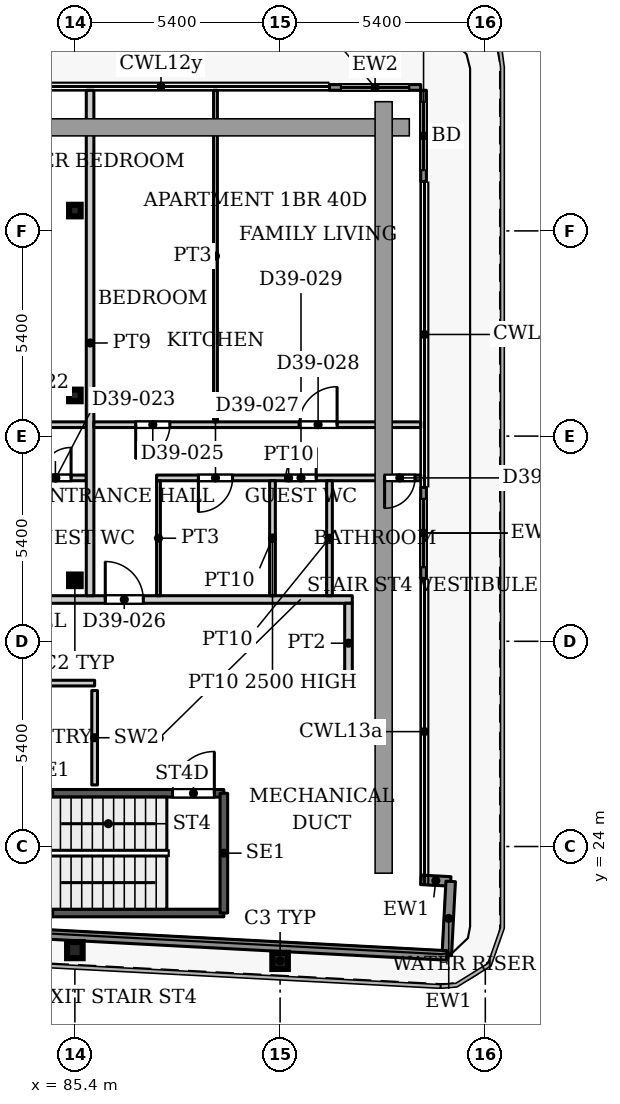
"""IFC4 building model, lengths in metres.
Left out: names, types, materials, properties, quantities, classifications, styles, units other than length and angle.
Written with IfcOpenShell. Run it as: python <this file> out.ifc"""

import sys

from ifc_helpers import new_model, si_unit, direction, frame, frame_2d, origin, origin_2d, place, context, subcontext, project, spatial, rectangle, hollow_rectangle, i_section, extrude, source, transform, mapped, element, fill, save


model = new_model("IFC4")
c1 = context("Model", 3, precision=1e-05, world=origin(), true_north=direction((0.0, 1.0)))
c2 = subcontext(c1, "Body", "Model", "MODEL_VIEW")
j1 = project(units=[si_unit("LENGTHUNIT", "METRE"), si_unit("PLANEANGLEUNIT", "RADIAN")], contexts=[c1])
p1 = place(None, origin())
s1 = spatial("IfcSite", under=j1, at=p1, CompositionType="ELEMENT")
p2 = place(p1, origin())
s2 = spatial("IfcBuilding", under=s1, at=p2, CompositionType="ELEMENT")
p3 = place(p2, frame((0.0, 0.0, 172.1)))
s3 = spatial("IfcBuildingStorey", under=s2, at=p3, CompositionType="ELEMENT", Elevation=172.1)
for number, where, z_axis, x_axis in (
    (1, (90.8, 20.99, 0.0), (0.0, 0.0, 1.0), (1.0, 0.0, 0.0)),
    (2, (85.4, 21.274, 0.0), (0.0, 0.0, 1.0), (1.0, 0.0, 0.0)),
):
    element("IfcColumn", number, at=place(p3, frame(where, z_axis=z_axis, x_axis=x_axis)), inside=s3, PredefinedType="COLUMN", context=c2, shape_type="SweptSolid", body=[
        extrude(i_section(OverallWidth=0.409, OverallDepth=0.425, WebThickness=0.033, FlangeThickness=0.052, FilletRadius=0.013, at=origin_2d()), origin(), (0.0, 0.0, 1.0), 3.9),
    ])
for number, where, z_axis, x_axis in (
    (3, (85.4, 31.005, 0.0), (0.0, 0.0, 1.0), (1.0, 0.0, 0.0)),
    (4, (85.4, 35.87, 0.0), (0.0, 0.0, 1.0), (1.0, 0.0, 0.0)),
    (5, (85.4, 40.735, 0.0), (0.0, 0.0, 1.0), (1.0, 0.0, 0.0)),
):
    element("IfcColumn", number, at=place(p3, frame(where, z_axis=z_axis, x_axis=x_axis)), inside=s3, PredefinedType="COLUMN", context=c2, shape_type="SweptSolid", body=[
        extrude(hollow_rectangle(XDim=0.305, YDim=0.305, WallThickness=0.016, InnerFilletRadius=0.016, OuterFilletRadius=0.032, at=origin_2d()), origin(), (0.0, 0.0, 1.0), 3.9),
    ])
p4 = place(p3, frame((92.1, 43.975, 0.0), z_axis=(0.0, 0.0, 1.0), x_axis=(1.0, 0.0, 0.0)))
e6 = element("IfcWall", 6, at=p4, inside=s3, PredefinedType="SOLIDWALL", context=c2, shape_type="SweptSolid", body=[
    extrude(rectangle(XDim=2.4, YDim=0.15, at=frame_2d((1.2, 0.0))), origin(), (0.0, 0.0, 1.0), 3.75),
])
p5 = place(p4, frame((0.3, 0.0, 0.0)))
e7 = element("IfcOpeningElement", 7, at=p5, cuts=e6, PredefinedType="OPENING", context=c2, shape_type="SweptSolid", body=[
    extrude(rectangle(XDim=1.8, YDim=2.4, at=frame_2d((0.9, 1.2))), frame((0.0, 0.085, 0.0), z_axis=(0.0, -1.0, 0.0), x_axis=(1.0, 0.0, 0.0)), (0.0, 0.0, 1.0), 0.17),
])
p6 = place(p3, frame((94.575, 43.9, 0.0), z_axis=(0.0, 0.0, 1.0), x_axis=(0.0, -1.0, 0.0)))
e8 = element("IfcWall", 8, at=p6, inside=s3, PredefinedType="SOLIDWALL", context=c2, shape_type="SweptSolid", body=[
    extrude(rectangle(XDim=2.4, YDim=0.15, at=frame_2d((1.2, 0.0))), origin(), (0.0, 0.0, 1.0), 3.75),
])
p7 = place(p6, frame((0.3, 0.0, 0.0)))
e9 = element("IfcOpeningElement", 9, at=p7, cuts=e8, PredefinedType="OPENING", context=c2, shape_type="SweptSolid", body=[
    extrude(rectangle(XDim=1.8, YDim=2.4, at=frame_2d((0.9, 1.2))), frame((0.0, 0.085, 0.0), z_axis=(0.0, -1.0, 0.0), x_axis=(1.0, 0.0, 0.0)), (0.0, 0.0, 1.0), 0.17),
])
p8 = place(p3, frame((94.575, 33.449, 0.0), z_axis=(0.0, 0.0, 1.0), x_axis=(0.0, -1.0, 0.0)))
e10 = element("IfcWall", 10, at=p8, inside=s3, PredefinedType="SOLIDWALL", context=c2, shape_type="SweptSolid", body=[
    extrude(rectangle(XDim=2.4, YDim=0.15, at=frame_2d((1.2, 0.0))), origin(), (0.0, 0.0, 1.0), 3.75),
])
p9 = place(p8, frame((0.3, 0.0, 0.0)))
e11 = element("IfcOpeningElement", 11, at=p9, cuts=e10, PredefinedType="OPENING", context=c2, shape_type="SweptSolid", body=[
    extrude(rectangle(XDim=1.8, YDim=2.4, at=frame_2d((0.9, 1.2))), frame((0.0, 0.085, 0.0), z_axis=(0.0, -1.0, 0.0), x_axis=(1.0, 0.0, 0.0)), (0.0, 0.0, 1.0), 0.17),
])
p10 = place(p3, frame((94.507, 23.123, 0.0), z_axis=(0.0, 0.0, 1.0), x_axis=(0.998561284263, -0.053622398031, 0.0)))
e12 = element("IfcWall", 12, at=p10, inside=s3, PredefinedType="SOLIDWALL", context=c2, shape_type="SweptSolid", body=[
    extrude(rectangle(XDim=0.783, YDim=0.25, at=frame_2d((0.392, 0.0))), origin(), (0.0, 0.0, 1.0), 3.75),
])
p11 = place(p3, frame((95.289, 23.081, 0.0), z_axis=(0.0, 0.0, 1.0), x_axis=(-0.052841433274, -0.998602915542, 0.0)))
e13 = element("IfcWall", 13, at=p11, inside=s3, PredefinedType="SOLIDWALL", context=c2, shape_type="SweptSolid", body=[
    extrude(rectangle(XDim=1.95, YDim=0.25, at=frame_2d((0.975, 0.0))), origin(), (0.0, 0.0, 1.0), 3.75),
])
p12 = place(p3, frame((95.186, 21.134, 0.0), z_axis=(0.0, 0.0, 1.0), x_axis=(-0.998617201448, 0.052570761569, 0.0)))
e14 = element("IfcWall", 14, at=p12, inside=s3, PredefinedType="SOLIDWALL", context=c2, shape_type="SweptSolid", body=[
    extrude(rectangle(XDim=61.232, YDim=0.25, at=frame_2d((30.616, 0.0))), origin(), (0.0, 0.0, 1.0), 3.75),
])
p13 = place(p3, frame((80.16, 22.25, 0.0), z_axis=(0.0, 0.0, 1.0), x_axis=(1.0, 0.0, 0.0)))
e15 = element("IfcWall", 15, at=p13, inside=s3, PredefinedType="SHEAR", context=c2, shape_type="SweptSolid", body=[
    extrude(rectangle(XDim=9.16, YDim=0.2, at=frame_2d((4.58, 0.0))), origin(), (0.0, 0.0, 1.0), 3.9),
])
p14 = place(p3, frame((80.16, 25.4, 0.0), z_axis=(0.0, 0.0, 1.0), x_axis=(1.0, 0.0, 0.0)))
e16 = element("IfcWall", 16, at=p14, inside=s3, PredefinedType="SHEAR", context=c2, shape_type="SweptSolid", body=[
    extrude(rectangle(XDim=9.16, YDim=0.2, at=frame_2d((4.58, 0.0))), origin(), (0.0, 0.0, 1.0), 3.9),
])
p15 = place(p14, frame((7.81, 0.0, 0.0)))
e17 = element("IfcOpeningElement", 17, at=p15, cuts=e16, PredefinedType="OPENING", context=c2, shape_type="SweptSolid", body=[
    extrude(rectangle(XDim=1.1, YDim=2.2, at=frame_2d((0.55, 1.1))), frame((0.0, 0.11, 0.0), z_axis=(0.0, -1.0, 0.0), x_axis=(1.0, 0.0, 0.0)), (0.0, 0.0, 1.0), 0.22),
])
p16 = place(p3, frame((89.32, 22.25, 0.0), z_axis=(0.0, 0.0, 1.0), x_axis=(0.0, 1.0, 0.0)))
e18 = element("IfcWall", 18, at=p16, inside=s3, PredefinedType="SHEAR", context=c2, shape_type="SweptSolid", body=[
    extrude(rectangle(XDim=3.15, YDim=0.2, at=frame_2d((1.575, 0.0))), origin(), (0.0, 0.0, 1.0), 3.9),
])
p17 = place(p3, frame((81.441, 28.3, 0.0), z_axis=(0.0, 0.0, 1.0), x_axis=(1.0, 0.0, 0.0)))
e19 = element("IfcWall", 19, at=p17, inside=s3, PredefinedType="PARTITIONING", context=c2, shape_type="SweptSolid", body=[
    extrude(rectangle(XDim=4.479, YDim=0.15, at=frame_2d((2.24, 0.0))), origin(), (0.0, 0.0, 1.0), 3.9),
])
p18 = place(p17, frame((1.789, 0.0, 0.0)))
e20 = element("IfcOpeningElement", 20, at=p18, cuts=e19, PredefinedType="OPENING", context=c2, shape_type="SweptSolid", body=[
    extrude(rectangle(XDim=0.9, YDim=2.2, at=frame_2d((0.45, 1.1))), frame((0.0, 0.085, 0.0), z_axis=(0.0, -1.0, 0.0), x_axis=(1.0, 0.0, 0.0)), (0.0, 0.0, 1.0), 0.17),
])
p19 = place(p3, frame((85.92, 25.62, 0.0), z_axis=(0.0, 0.0, 1.0), x_axis=(0.0, 1.0, 0.0)))
e21 = element("IfcWall", 21, at=p19, inside=s3, PredefinedType="PARTITIONING", context=c2, shape_type="SweptSolid", body=[
    extrude(rectangle(XDim=2.485, YDim=0.15, at=frame_2d((1.242, 0.0))), origin(), (0.0, 0.0, 1.0), 3.9),
])
p20 = place(p3, frame((53.549, 30.5, 0.0), z_axis=(0.0, 0.0, 1.0), x_axis=(1.0, 0.0, 0.0)))
e22 = element("IfcWall", 22, at=p20, inside=s3, PredefinedType="PARTITIONING", context=c2, shape_type="SweptSolid", body=[
    extrude(rectangle(XDim=39.151, YDim=0.2, at=frame_2d((19.575, 0.0))), origin(), (0.0, 0.0, 1.0), 3.6),
])
p21 = place(p20, frame((2.801, 0.0, 0.0)))
e23 = element("IfcOpeningElement", 23, at=p21, cuts=e22, PredefinedType="OPENING", context=c2, shape_type="SweptSolid", body=[
    extrude(rectangle(XDim=1.0, YDim=2.1, at=frame_2d((0.5, 1.05))), frame((0.0, 0.11, 0.0), z_axis=(0.0, -1.0, 0.0), x_axis=(1.0, 0.0, 0.0)), (0.0, 0.0, 1.0), 0.22),
])
p22 = place(p20, frame((9.851, 0.0, 0.0)))
e24 = element("IfcOpeningElement", 24, at=p22, cuts=e22, PredefinedType="OPENING", context=c2, shape_type="SweptSolid", body=[
    extrude(rectangle(XDim=1.0, YDim=2.1, at=frame_2d((0.5, 1.05))), frame((0.0, 0.11, 0.0), z_axis=(0.0, -1.0, 0.0), x_axis=(1.0, 0.0, 0.0)), (0.0, 0.0, 1.0), 0.22),
])
p23 = place(p20, frame((28.751, 0.0, 0.0)))
e25 = element("IfcOpeningElement", 25, at=p23, cuts=e22, PredefinedType="OPENING", context=c2, shape_type="SweptSolid", body=[
    extrude(rectangle(XDim=1.0, YDim=2.1, at=frame_2d((0.5, 1.05))), frame((0.0, 0.11, 0.0), z_axis=(0.0, -1.0, 0.0), x_axis=(1.0, 0.0, 0.0)), (0.0, 0.0, 1.0), 0.22),
])
p24 = place(p20, frame((32.651, 0.0, 0.0)))
e26 = element("IfcOpeningElement", 26, at=p24, cuts=e22, PredefinedType="OPENING", context=c2, shape_type="SweptSolid", body=[
    extrude(rectangle(XDim=1.0, YDim=2.1, at=frame_2d((0.5, 1.05))), frame((0.0, 0.11, 0.0), z_axis=(0.0, -1.0, 0.0), x_axis=(1.0, 0.0, 0.0)), (0.0, 0.0, 1.0), 0.22),
])
p25 = place(p3, frame((75.4, 35.1, 0.0), z_axis=(0.0, 0.0, 1.0), x_axis=(1.0, 0.0, 0.0)))
e27 = element("IfcWall", 27, at=p25, inside=s3, PredefinedType="PARTITIONING", context=c2, shape_type="SweptSolid", body=[
    extrude(rectangle(XDim=10.3, YDim=0.15, at=frame_2d((5.15, 0.0))), origin(), (0.0, 0.0, 1.0), 3.6),
])
p26 = place(p25, frame((5.3, 0.0, 0.0)))
e28 = element("IfcOpeningElement", 28, at=p26, cuts=e27, PredefinedType="OPENING", context=c2, shape_type="SweptSolid", body=[
    extrude(rectangle(XDim=0.9, YDim=2.1, at=frame_2d((0.45, 1.05))), frame((0.0, 0.085, 0.0), z_axis=(0.0, -1.0, 0.0), x_axis=(1.0, 0.0, 0.0)), (0.0, 0.0, 1.0), 0.17),
])
p27 = place(p25, frame((1.65, 0.0, 0.0)))
e29 = element("IfcOpeningElement", 29, at=p27, cuts=e27, PredefinedType="OPENING", context=c2, shape_type="SweptSolid", body=[
    extrude(rectangle(XDim=1.0, YDim=2.1, at=frame_2d((0.5, 1.05))), frame((0.0, 0.085, 0.0), z_axis=(0.0, -1.0, 0.0), x_axis=(1.0, 0.0, 0.0)), (0.0, 0.0, 1.0), 0.17),
])
p28 = place(p25, frame((8.3, 0.0, 0.0)))
e30 = element("IfcOpeningElement", 30, at=p28, cuts=e27, PredefinedType="OPENING", context=c2, shape_type="SweptSolid", body=[
    extrude(rectangle(XDim=0.9, YDim=2.1, at=frame_2d((0.45, 1.05))), frame((0.0, 0.085, 0.0), z_axis=(0.0, -1.0, 0.0), x_axis=(1.0, 0.0, 0.0)), (0.0, 0.0, 1.0), 0.17),
])
p29 = place(p3, frame((84.075, 33.7, 0.0), z_axis=(0.0, 0.0, 1.0), x_axis=(1.0, 0.0, 0.0)))
e31 = element("IfcWall", 31, at=p29, inside=s3, PredefinedType="PARTITIONING", context=c2, shape_type="SweptSolid", body=[
    extrude(rectangle(XDim=1.625, YDim=0.15, at=frame_2d((0.812, 0.0))), origin(), (0.0, 0.0, 1.0), 3.6),
])
p30 = place(p29, frame((0.425, 0.0, 0.0)))
e32 = element("IfcOpeningElement", 32, at=p30, cuts=e31, PredefinedType="OPENING", context=c2, shape_type="SweptSolid", body=[
    extrude(rectangle(XDim=0.8, YDim=2.1, at=frame_2d((0.4, 1.05))), frame((0.0, 0.085, 0.0), z_axis=(0.0, -1.0, 0.0), x_axis=(1.0, 0.0, 0.0)), (0.0, 0.0, 1.0), 0.17),
])
p31 = place(p3, frame((85.8, 30.6, 0.0), z_axis=(0.0, 0.0, 1.0), x_axis=(0.0, 1.0, 0.0)))
e33 = element("IfcWall", 33, at=p31, inside=s3, PredefinedType="PARTITIONING", context=c2, shape_type="SweptSolid", body=[
    extrude(rectangle(XDim=13.3, YDim=0.2, at=frame_2d((6.65, 0.0))), origin(), (0.0, 0.0, 1.0), 3.6),
])
p32 = place(p3, frame((85.9, 35.1, 0.0), z_axis=(0.0, 0.0, 1.0), x_axis=(1.0, 0.0, 0.0)))
e34 = element("IfcWall", 34, at=p32, inside=s3, PredefinedType="PARTITIONING", context=c2, shape_type="SweptSolid", body=[
    extrude(rectangle(XDim=8.6, YDim=0.15, at=frame_2d((4.3, 0.0))), origin(), (0.0, 0.0, 1.0), 3.6),
])
p33 = place(p32, frame((1.1, 0.0, 0.0)))
e35 = element("IfcOpeningElement", 35, at=p33, cuts=e34, PredefinedType="OPENING", context=c2, shape_type="SweptSolid", body=[
    extrude(rectangle(XDim=0.9, YDim=2.1, at=frame_2d((0.45, 1.05))), frame((0.0, 0.085, 0.0), z_axis=(0.0, -1.0, 0.0), x_axis=(1.0, 0.0, 0.0)), (0.0, 0.0, 1.0), 0.17),
])
p34 = place(p32, frame((5.4, 0.0, 0.0)))
e36 = element("IfcOpeningElement", 36, at=p34, cuts=e34, PredefinedType="OPENING", context=c2, shape_type="SweptSolid", body=[
    extrude(rectangle(XDim=1.0, YDim=2.1, at=frame_2d((0.5, 1.05))), frame((0.0, 0.085, 0.0), z_axis=(0.0, -1.0, 0.0), x_axis=(1.0, 0.0, 0.0)), (0.0, 0.0, 1.0), 0.17),
])
p35 = place(p3, frame((87.55, 33.7, 0.0), z_axis=(0.0, 0.0, 1.0), x_axis=(1.0, 0.0, 0.0)))
e37 = element("IfcWall", 37, at=p35, inside=s3, PredefinedType="PARTITIONING", context=c2, shape_type="SweptSolid", body=[
    extrude(rectangle(XDim=6.95, YDim=0.15, at=frame_2d((3.475, 0.0))), origin(), (0.0, 0.0, 1.0), 3.6),
])
p36 = place(p35, frame((6.0, 0.0, 0.0)))
e38 = element("IfcOpeningElement", 38, at=p36, cuts=e37, PredefinedType="OPENING", context=c2, shape_type="SweptSolid", body=[
    extrude(rectangle(XDim=0.8, YDim=2.1, at=frame_2d((0.4, 1.05))), frame((0.0, 0.085, 0.0), z_axis=(0.0, -1.0, 0.0), x_axis=(1.0, 0.0, 0.0)), (0.0, 0.0, 1.0), 0.17),
])
p37 = place(p35, frame((1.1, 0.0, 0.0)))
e39 = element("IfcOpeningElement", 39, at=p37, cuts=e37, PredefinedType="OPENING", context=c2, shape_type="SweptSolid", body=[
    extrude(rectangle(XDim=0.9, YDim=2.1, at=frame_2d((0.45, 1.05))), frame((0.0, 0.085, 0.0), z_axis=(0.0, -1.0, 0.0), x_axis=(1.0, 0.0, 0.0)), (0.0, 0.0, 1.0), 0.17),
])
p38 = place(p35, frame((3.4, 0.0, 0.0)))
e40 = element("IfcOpeningElement", 40, at=p38, cuts=e37, PredefinedType="OPENING", context=c2, shape_type="SweptSolid", body=[
    extrude(rectangle(XDim=0.8, YDim=2.1, at=frame_2d((0.4, 1.05))), frame((0.0, 0.085, 0.0), z_axis=(0.0, -1.0, 0.0), x_axis=(1.0, 0.0, 0.0)), (0.0, 0.0, 1.0), 0.17),
])
p39 = place(p3, frame((87.6, 30.6, 0.0), z_axis=(0.0, 0.0, 1.0), x_axis=(0.0, 1.0, 0.0)))
e41 = element("IfcWall", 41, at=p39, inside=s3, PredefinedType="PARTITIONING", context=c2, shape_type="SweptSolid", body=[
    extrude(rectangle(XDim=3.025, YDim=0.1, at=frame_2d((1.512, 0.0))), origin(), (0.0, 0.0, 1.0), 3.6),
])
p40 = place(p3, frame((89.1, 35.175, 0.0), z_axis=(0.0, 0.0, 1.0), x_axis=(0.0, 1.0, 0.0)))
e42 = element("IfcWall", 42, at=p40, inside=s3, PredefinedType="PARTITIONING", context=c2, shape_type="SweptSolid", body=[
    extrude(rectangle(XDim=8.725, YDim=0.1, at=frame_2d((4.362, 0.0))), origin(), (0.0, 0.0, 1.0), 3.6),
])
p41 = place(p3, frame((90.6, 30.6, 0.0), z_axis=(0.0, 0.0, 1.0), x_axis=(0.0, 1.0, 0.0)))
e43 = element("IfcWall", 43, at=p41, inside=s3, PredefinedType="PARTITIONING", context=c2, shape_type="SweptSolid", body=[
    extrude(rectangle(XDim=3.025, YDim=0.15, at=frame_2d((1.512, 0.0))), origin(), (0.0, 0.0, 1.0), 2.5),
])
p42 = place(p3, frame((92.1, 30.6, 0.0), z_axis=(0.0, 0.0, 1.0), x_axis=(0.0, 1.0, 0.0)))
e44 = element("IfcWall", 44, at=p42, inside=s3, PredefinedType="PARTITIONING", context=c2, shape_type="SweptSolid", body=[
    extrude(rectangle(XDim=3.025, YDim=0.15, at=frame_2d((1.512, 0.0))), origin(), (0.0, 0.0, 1.0), 3.6),
])
p43 = place(p3, frame((92.6, 28.3, 0.0), z_axis=(0.0, 0.0, 1.0), x_axis=(0.0, 1.0, 0.0)))
e45 = element("IfcWall", 45, at=p43, inside=s3, PredefinedType="PARTITIONING", context=c2, shape_type="SweptSolid", body=[
    extrude(rectangle(XDim=2.1, YDim=0.2, at=frame_2d((1.05, 0.0))), origin(), (0.0, 0.0, 1.0), 3.6),
])
m1 = source(origin(), c2, "Body", "SweptSolid", [
    extrude(rectangle(XDim=1.8, YDim=2.4, at=frame_2d((0.9, 1.2))), frame((0.0, 0.025, 0.0), z_axis=(0.0, -1.0, 0.0), x_axis=(1.0, 0.0, 0.0)), (0.0, 0.0, 1.0), 0.05),
])
p44 = place(p5, origin())
e46 = element("IfcDoor", 46, at=p44, inside=s3, OperationType="SLIDING_TO_LEFT", PredefinedType="DOOR", context=c2, shape_type="MappedRepresentation", body=[
    mapped(m1, transform((0.0, 0.0, 0.0), x_axis=(1.0, 0.0, 0.0), y_axis=(0.0, 1.0, 0.0), z_axis=(0.0, 0.0, 1.0), scale=1.0)),
])
fill(e7, e46)
p45 = place(p7, origin())
e47 = element("IfcDoor", 47, at=p45, inside=s3, OperationType="SLIDING_TO_LEFT", PredefinedType="DOOR", context=c2, shape_type="MappedRepresentation", body=[
    mapped(m1, transform((0.0, 0.0, 0.0), x_axis=(1.0, 0.0, 0.0), y_axis=(0.0, 1.0, 0.0), z_axis=(0.0, 0.0, 1.0), scale=1.0)),
])
fill(e9, e47)
p46 = place(p9, origin())
e48 = element("IfcDoor", 48, at=p46, inside=s3, OperationType="SLIDING_TO_LEFT", PredefinedType="DOOR", context=c2, shape_type="MappedRepresentation", body=[
    mapped(m1, transform((0.0, 0.0, 0.0), x_axis=(1.0, 0.0, 0.0), y_axis=(0.0, 1.0, 0.0), z_axis=(0.0, 0.0, 1.0), scale=1.0)),
])
fill(e11, e48)
m2 = source(origin(), c2, "Body", "SweptSolid", [
    extrude(rectangle(XDim=1.1, YDim=2.2, at=frame_2d((0.55, 1.1))), frame((0.0, 0.025, 0.0), z_axis=(0.0, -1.0, 0.0), x_axis=(1.0, 0.0, 0.0)), (0.0, 0.0, 1.0), 0.05),
])
p47 = place(p15, origin())
e49 = element("IfcDoor", 49, at=p47, inside=s3, OperationType="SINGLE_SWING_LEFT", PredefinedType="DOOR", context=c2, shape_type="MappedRepresentation", body=[
    mapped(m2, transform((0.0, 0.0, 0.0), x_axis=(1.0, 0.0, 0.0), y_axis=(0.0, 1.0, 0.0), z_axis=(0.0, 0.0, 1.0), scale=1.0)),
])
fill(e17, e49)
m3 = source(origin(), c2, "Body", "SweptSolid", [
    extrude(rectangle(XDim=0.8, YDim=2.1, at=frame_2d((0.4, 1.05))), frame((0.0, 0.025, 0.0), z_axis=(0.0, -1.0, 0.0), x_axis=(1.0, 0.0, 0.0)), (0.0, 0.0, 1.0), 0.05),
])
p48 = place(p30, origin())
e50 = element("IfcDoor", 50, at=p48, inside=s3, OperationType="SINGLE_SWING_LEFT", PredefinedType="DOOR", context=c2, shape_type="MappedRepresentation", body=[
    mapped(m3, transform((0.0, 0.0, 0.0), x_axis=(1.0, 0.0, 0.0), y_axis=(0.0, 1.0, 0.0), z_axis=(0.0, 0.0, 1.0), scale=1.0)),
])
fill(e32, e50)
p49 = place(p36, origin())
e51 = element("IfcDoor", 51, at=p49, inside=s3, OperationType="SINGLE_SWING_RIGHT", PredefinedType="DOOR", context=c2, shape_type="MappedRepresentation", body=[
    mapped(m3, transform((0.0, 0.0, 0.0), x_axis=(1.0, 0.0, 0.0), y_axis=(0.0, 1.0, 0.0), z_axis=(0.0, 0.0, 1.0), scale=1.0)),
])
fill(e38, e51)
m4 = source(origin(), c2, "Body", "SweptSolid", [
    extrude(rectangle(XDim=0.9, YDim=2.1, at=frame_2d((0.45, 1.05))), frame((0.0, 0.025, 0.0), z_axis=(0.0, -1.0, 0.0), x_axis=(1.0, 0.0, 0.0)), (0.0, 0.0, 1.0), 0.05),
])
p50 = place(p33, origin())
e52 = element("IfcDoor", 52, at=p50, inside=s3, OperationType="SINGLE_SWING_RIGHT", PredefinedType="DOOR", context=c2, shape_type="MappedRepresentation", body=[
    mapped(m4, transform((0.0, 0.0, 0.0), x_axis=(1.0, 0.0, 0.0), y_axis=(0.0, 1.0, 0.0), z_axis=(0.0, 0.0, 1.0), scale=1.0)),
])
fill(e35, e52)
m5 = source(origin(), c2, "Body", "SweptSolid", [
    extrude(rectangle(XDim=1.0, YDim=2.1, at=frame_2d((0.5, 1.05))), frame((0.0, 0.025, 0.0), z_axis=(0.0, -1.0, 0.0), x_axis=(1.0, 0.0, 0.0)), (0.0, 0.0, 1.0), 0.05),
])
p51 = place(p24, origin())
e53 = element("IfcDoor", 53, at=p51, inside=s3, OperationType="SINGLE_SWING_LEFT", PredefinedType="DOOR", context=c2, shape_type="MappedRepresentation", body=[
    mapped(m5, transform((0.0, 0.0, 0.0), x_axis=(1.0, 0.0, 0.0), y_axis=(0.0, 1.0, 0.0), z_axis=(0.0, 0.0, 1.0), scale=1.0)),
])
fill(e26, e53)
p52 = place(p37, origin())
e54 = element("IfcDoor", 54, at=p52, inside=s3, OperationType="SINGLE_SWING_RIGHT", PredefinedType="DOOR", context=c2, shape_type="MappedRepresentation", body=[
    mapped(m4, transform((0.0, 0.0, 0.0), x_axis=(1.0, 0.0, 0.0), y_axis=(0.0, 1.0, 0.0), z_axis=(0.0, 0.0, 1.0), scale=1.0)),
])
fill(e39, e54)
m6 = source(origin(), c2, "Body", "SweptSolid", [
    extrude(rectangle(XDim=1.0, YDim=2.1, at=frame_2d((0.5, 1.05))), frame((0.0, 0.025, 0.0), z_axis=(0.0, -1.0, 0.0), x_axis=(1.0, 0.0, 0.0)), (0.0, 0.0, 1.0), 0.05),
])
p53 = place(p34, origin())
e55 = element("IfcDoor", 55, at=p53, inside=s3, OperationType="SINGLE_SWING_LEFT", PredefinedType="DOOR", context=c2, shape_type="MappedRepresentation", body=[
    mapped(m6, transform((0.0, 0.0, 0.0), x_axis=(1.0, 0.0, 0.0), y_axis=(0.0, 1.0, 0.0), z_axis=(0.0, 0.0, 1.0), scale=1.0)),
])
fill(e36, e55)
p54 = place(p38, origin())
e56 = element("IfcDoor", 56, at=p54, inside=s3, OperationType="SINGLE_SWING_LEFT", PredefinedType="DOOR", context=c2, shape_type="MappedRepresentation", body=[
    mapped(m3, transform((0.0, 0.0, 0.0), x_axis=(1.0, 0.0, 0.0), y_axis=(0.0, 1.0, 0.0), z_axis=(0.0, 0.0, 1.0), scale=1.0)),
])
fill(e40, e56)
save(model, sys.argv[1])
